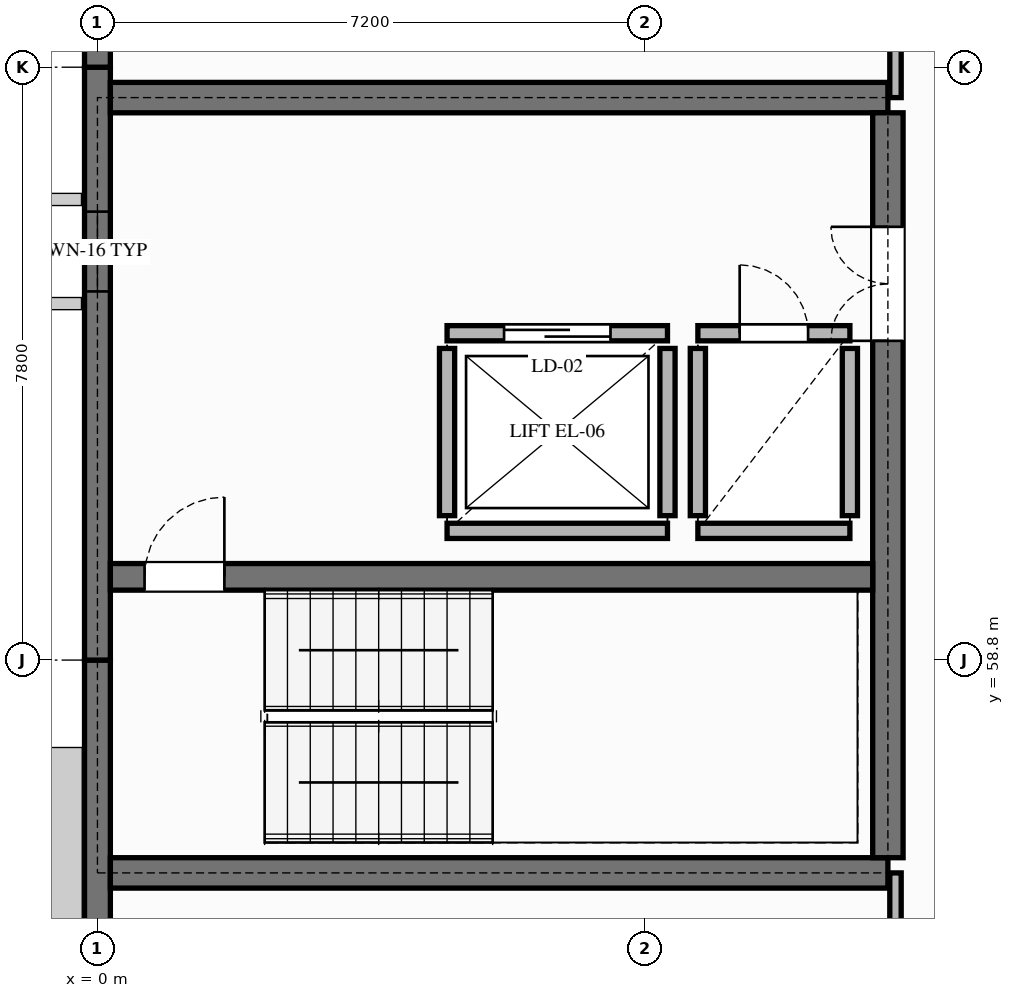
"""IFC4 building model, lengths in metres.
Left out: names, types, materials, properties, quantities, classifications, styles, units other than length and angle.
Written with IfcOpenShell. Run it as: python <this file> out.ifc"""

import sys

from ifc_helpers import new_model, si_unit, direction, frame, frame_2d, origin, place, context, subcontext, project, spatial, rectangle, extrude, element, fill, save


model = new_model("IFC4")
c1 = context("Model", 3, precision=1e-05, world=origin(), true_north=direction((0.0, 1.0)))
c2 = subcontext(c1, "Body", "Model", "MODEL_VIEW")
j1 = project(units=[si_unit("LENGTHUNIT", "METRE"), si_unit("PLANEANGLEUNIT", "RADIAN")], contexts=[c1])
p1 = place(None, origin())
s1 = spatial("IfcSite", under=j1, at=p1, CompositionType="ELEMENT")
p2 = place(p1, origin())
s2 = spatial("IfcBuilding", under=s1, at=p2, CompositionType="ELEMENT")
p3 = place(p2, frame((0.0, 0.0, 5.1)))
s3 = spatial("IfcBuildingStorey", under=s2, at=p3, CompositionType="ELEMENT", Elevation=5.1)
p4 = place(p3, frame((0.0, 51.0, 0.0), z_axis=(0.0, 0.0, 1.0), x_axis=(0.0, 1.0, 0.0)))
e1 = element("IfcWall", 1, at=p4, inside=s3, PredefinedType="SOLIDWALL", context=c2, shape_type="SweptSolid", body=[
    extrude(rectangle(XDim=7.8, YDim=0.34, at=frame_2d((3.9, 0.0))), origin(), (0.0, 0.0, 1.0), 3.55),
])
p5 = place(p4, frame((1.5, 0.0, 0.85)))
e2 = element("IfcOpeningElement", 2, at=p5, cuts=e1, PredefinedType="OPENING", context=c2, shape_type="SweptSolid", body=[
    extrude(rectangle(XDim=1.75, YDim=2.15, at=frame_2d((0.875, 1.075))), frame((0.0, 0.18, 0.0), z_axis=(0.0, -1.0, 0.0), x_axis=(1.0, 0.0, 0.0)), (0.0, 0.0, 1.0), 0.36),
])
p6 = place(p3, frame((0.0, 58.8, 0.0), z_axis=(0.0, 0.0, 1.0), x_axis=(0.0, 1.0, 0.0)))
e3 = element("IfcWall", 3, at=p6, inside=s3, PredefinedType="SOLIDWALL", context=c2, shape_type="SweptSolid", body=[
    extrude(rectangle(XDim=7.8, YDim=0.34, at=frame_2d((3.9, 0.0))), origin(), (0.0, 0.0, 1.0), 3.55),
])
p7 = place(p6, frame((4.85, 0.0, 1.1)))
e4 = element("IfcOpeningElement", 4, at=p7, cuts=e3, PredefinedType="OPENING", context=c2, shape_type="SweptSolid", body=[
    extrude(rectangle(XDim=1.05, YDim=1.75, at=frame_2d((0.525, 0.875))), frame((0.0, 0.18, 0.0), z_axis=(0.0, -1.0, 0.0), x_axis=(1.0, 0.0, 0.0)), (0.0, 0.0, 1.0), 0.36),
])
p8 = place(p3, frame((0.0, 66.6, 0.0), z_axis=(0.0, 0.0, 1.0), x_axis=(0.0, 1.0, 0.0)))
e5 = element("IfcWall", 5, at=p8, inside=s3, PredefinedType="SOLIDWALL", context=c2, shape_type="SweptSolid", body=[
    extrude(rectangle(XDim=7.8, YDim=0.34, at=frame_2d((3.9, 0.0))), origin(), (0.0, 0.0, 1.0), 3.55),
])
p9 = place(p8, frame((1.5, 0.0, 0.85)))
e6 = element("IfcOpeningElement", 6, at=p9, cuts=e5, PredefinedType="OPENING", context=c2, shape_type="SweptSolid", body=[
    extrude(rectangle(XDim=1.75, YDim=2.15, at=frame_2d((0.875, 1.075))), frame((0.0, 0.18, 0.0), z_axis=(0.0, -1.0, 0.0), x_axis=(1.0, 0.0, 0.0)), (0.0, 0.0, 1.0), 0.36),
])
p10 = place(p8, frame((4.3, 0.0, 0.85)))
e7 = element("IfcOpeningElement", 7, at=p10, cuts=e5, PredefinedType="OPENING", context=c2, shape_type="SweptSolid", body=[
    extrude(rectangle(XDim=2.1, YDim=2.25, at=frame_2d((1.05, 1.125))), frame((0.0, 0.18, 0.0), z_axis=(0.0, -1.0, 0.0), x_axis=(1.0, 0.0, 0.0)), (0.0, 0.0, 1.0), 0.36),
])
for number, where, z_axis, x_axis in (
    (8, (0.17, 56.0, 0.0), (0.0, 0.0, 1.0), (1.0, 0.0, 0.0)),
    (9, (0.17, 66.2, 0.0), (0.0, 0.0, 1.0), (1.0, 0.0, 0.0)),
):
    element("IfcWall", number, at=place(p3, frame(where, z_axis=z_axis, x_axis=x_axis)), inside=s3, PredefinedType="SHEAR", context=c2, shape_type="SweptSolid", body=[
        extrude(rectangle(XDim=10.23, YDim=0.4, at=frame_2d((5.115, 0.0))), origin(), (0.0, 0.0, 1.0), 3.55),
    ])
p11 = place(p3, frame((10.4, 56.2, 0.0), z_axis=(0.0, 0.0, 1.0), x_axis=(0.0, 1.0, 0.0)))
e10 = element("IfcWall", 10, at=p11, inside=s3, PredefinedType="SHEAR", context=c2, shape_type="SweptSolid", body=[
    extrude(rectangle(XDim=9.8, YDim=0.4, at=frame_2d((4.9, 0.0))), origin(), (0.0, 0.0, 1.0), 3.55),
])
p12 = place(p11, frame((6.8, 0.0, 0.0)))
e11 = element("IfcOpeningElement", 11, at=p12, cuts=e10, PredefinedType="OPENING", context=c2, shape_type="SweptSolid", body=[
    extrude(rectangle(XDim=1.5, YDim=2.2, at=frame_2d((0.75, 1.1))), frame((0.0, 0.21, 0.0), z_axis=(0.0, -1.0, 0.0), x_axis=(1.0, 0.0, 0.0)), (0.0, 0.0, 1.0), 0.42),
])
p13 = place(p3, frame((0.17, 59.895, 0.0), z_axis=(0.0, 0.0, 1.0), x_axis=(1.0, 0.0, 0.0)))
e12 = element("IfcWall", 12, at=p13, inside=s3, PredefinedType="SHEAR", context=c2, shape_type="SweptSolid", body=[
    extrude(rectangle(XDim=10.03, YDim=0.35, at=frame_2d((5.015, 0.0))), origin(), (0.0, 0.0, 1.0), 3.55),
])
p14 = place(p13, frame((0.45, 0.0, 0.0)))
e13 = element("IfcOpeningElement", 13, at=p14, cuts=e12, PredefinedType="OPENING", context=c2, shape_type="SweptSolid", body=[
    extrude(rectangle(XDim=1.05, YDim=2.2, at=frame_2d((0.525, 1.1))), frame((0.0, 0.185, 0.0), z_axis=(0.0, -1.0, 0.0), x_axis=(1.0, 0.0, 0.0)), (0.0, 0.0, 1.0), 0.37),
])
p15 = place(p3, frame((4.6, 60.5, 0.0), z_axis=(0.0, 0.0, 1.0), x_axis=(1.0, 0.0, 0.0)))
e14 = element("IfcWall", 14, at=p15, inside=s3, PredefinedType="PARTITIONING", context=c2, shape_type="SweptSolid", body=[
    extrude(rectangle(XDim=2.9, YDim=0.2, at=frame_2d((1.45, 0.0))), origin(), (0.0, 0.0, 1.0), 3.55),
])
p16 = place(p3, frame((4.6, 63.1, 0.0), z_axis=(0.0, 0.0, 1.0), x_axis=(1.0, 0.0, 0.0)))
e15 = element("IfcWall", 15, at=p16, inside=s3, PredefinedType="PARTITIONING", context=c2, shape_type="SweptSolid", body=[
    extrude(rectangle(XDim=2.9, YDim=0.2, at=frame_2d((1.45, 0.0))), origin(), (0.0, 0.0, 1.0), 3.55),
])
p17 = place(p16, frame((0.75, 0.0, 0.0)))
e16 = element("IfcOpeningElement", 16, at=p17, cuts=e15, PredefinedType="OPENING", context=c2, shape_type="SweptSolid", body=[
    extrude(rectangle(XDim=1.4, YDim=2.25, at=frame_2d((0.7, 1.125))), frame((0.0, 0.11, 0.0), z_axis=(0.0, -1.0, 0.0), x_axis=(1.0, 0.0, 0.0)), (0.0, 0.0, 1.0), 0.22),
])
for number, where, z_axis, x_axis in (
    (17, (4.6, 60.7, 0.0), (0.0, 0.0, 1.0), (0.0, 1.0, 0.0)),
    (18, (7.5, 60.7, 0.0), (0.0, 0.0, 1.0), (0.0, 1.0, 0.0)),
):
    element("IfcWall", number, at=place(p3, frame(where, z_axis=z_axis, x_axis=x_axis)), inside=s3, PredefinedType="PARTITIONING", context=c2, shape_type="SweptSolid", body=[
        extrude(rectangle(XDim=2.2, YDim=0.2, at=frame_2d((1.1, 0.0))), origin(), (0.0, 0.0, 1.0), 3.55),
    ])
p18 = place(p3, frame((7.9, 60.5, 0.0), z_axis=(0.0, 0.0, 1.0), x_axis=(1.0, 0.0, 0.0)))
e19 = element("IfcWall", 19, at=p18, inside=s3, PredefinedType="PARTITIONING", context=c2, shape_type="SweptSolid", body=[
    extrude(rectangle(XDim=2.0, YDim=0.2, at=frame_2d((1.0, 0.0))), origin(), (0.0, 0.0, 1.0), 3.55),
])
p19 = place(p3, frame((7.9, 63.1, 0.0), z_axis=(0.0, 0.0, 1.0), x_axis=(1.0, 0.0, 0.0)))
e20 = element("IfcWall", 20, at=p19, inside=s3, PredefinedType="PARTITIONING", context=c2, shape_type="SweptSolid", body=[
    extrude(rectangle(XDim=2.0, YDim=0.2, at=frame_2d((1.0, 0.0))), origin(), (0.0, 0.0, 1.0), 3.55),
])
p20 = place(p19, frame((0.55, 0.0, 0.0)))
e21 = element("IfcOpeningElement", 21, at=p20, cuts=e20, PredefinedType="OPENING", context=c2, shape_type="SweptSolid", body=[
    extrude(rectangle(XDim=0.9, YDim=2.1, at=frame_2d((0.45, 1.05))), frame((0.0, 0.11, 0.0), z_axis=(0.0, -1.0, 0.0), x_axis=(1.0, 0.0, 0.0)), (0.0, 0.0, 1.0), 0.22),
])
for number, where, z_axis, x_axis in (
    (22, (7.9, 60.7, 0.0), (0.0, 0.0, 1.0), (0.0, 1.0, 0.0)),
    (23, (9.9, 60.7, 0.0), (0.0, 0.0, 1.0), (0.0, 1.0, 0.0)),
):
    element("IfcWall", number, at=place(p3, frame(where, z_axis=z_axis, x_axis=x_axis)), inside=s3, PredefinedType="PARTITIONING", context=c2, shape_type="SweptSolid", body=[
        extrude(rectangle(XDim=2.2, YDim=0.2, at=frame_2d((1.1, 0.0))), origin(), (0.0, 0.0, 1.0), 3.55),
    ])
p21 = place(p3, frame((10.5, 28.8, 0.0), z_axis=(0.0, 0.0, 1.0), x_axis=(0.0, 1.0, 0.0)))
e24 = element("IfcWall", 24, at=p21, inside=s3, PredefinedType="PARTITIONING", context=c2, shape_type="SweptSolid", body=[
    extrude(rectangle(XDim=27.2, YDim=0.15, at=frame_2d((13.6, 0.0))), origin(), (0.0, 0.0, 1.0), 3.199),
])
p22 = place(p21, frame((10.0, 0.0, 0.0)))
e25 = element("IfcOpeningElement", 25, at=p22, cuts=e24, PredefinedType="OPENING", context=c2, shape_type="SweptSolid", body=[
    extrude(rectangle(XDim=1.0, YDim=2.15, at=frame_2d((0.5, 1.075))), frame((0.0, 0.085, 0.0), z_axis=(0.0, -1.0, 0.0), x_axis=(1.0, 0.0, 0.0)), (0.0, 0.0, 1.0), 0.17),
])
p23 = place(p3, frame((10.5, 66.2, 0.0), z_axis=(0.0, 0.0, 1.0), x_axis=(0.0, 1.0, 0.0)))
e26 = element("IfcWall", 26, at=p23, inside=s3, PredefinedType="PARTITIONING", context=c2, shape_type="SweptSolid", body=[
    extrude(rectangle(XDim=8.2, YDim=0.15, at=frame_2d((4.1, 0.0))), origin(), (0.0, 0.0, 1.0), 3.55),
])
p24 = place(p23, frame((3.2, 0.0, 0.0)))
e27 = element("IfcOpeningElement", 27, at=p24, cuts=e26, PredefinedType="OPENING", context=c2, shape_type="SweptSolid", body=[
    extrude(rectangle(XDim=1.0, YDim=2.15, at=frame_2d((0.5, 1.075))), frame((0.0, 0.085, 0.0), z_axis=(0.0, -1.0, 0.0), x_axis=(1.0, 0.0, 0.0)), (0.0, 0.0, 1.0), 0.17),
])
p25 = place(p7, origin())
e28 = element("IfcWindow", 28, at=p25, inside=s3, PartitioningType="SINGLE_PANEL", PredefinedType="WINDOW", context=c2, shape_type="SweptSolid", body=[
    extrude(rectangle(XDim=1.05, YDim=1.75, at=frame_2d((0.525, 0.875))), frame((0.0, 0.03, 0.0), z_axis=(0.0, -1.0, 0.0), x_axis=(1.0, 0.0, 0.0)), (0.0, 0.0, 1.0), 0.06),
])
fill(e4, e28)
p26 = place(p12, origin())
e29 = element("IfcDoor", 29, at=p26, inside=s3, OperationType="DOUBLE_DOOR_SINGLE_SWING", PredefinedType="DOOR", context=c2, shape_type="SweptSolid", body=[
    extrude(rectangle(XDim=1.5, YDim=2.2, at=frame_2d((0.75, 1.1))), frame((0.0, 0.025, 0.0), z_axis=(0.0, -1.0, 0.0), x_axis=(1.0, 0.0, 0.0)), (0.0, 0.0, 1.0), 0.05),
])
fill(e11, e29)
p27 = place(p14, origin())
e30 = element("IfcDoor", 30, at=p27, inside=s3, OperationType="SINGLE_SWING_RIGHT", PredefinedType="DOOR", context=c2, shape_type="SweptSolid", body=[
    extrude(rectangle(XDim=1.05, YDim=2.2, at=frame_2d((0.525, 1.1))), frame((0.0, 0.025, 0.0), z_axis=(0.0, -1.0, 0.0), x_axis=(1.0, 0.0, 0.0)), (0.0, 0.0, 1.0), 0.05),
])
fill(e13, e30)
p28 = place(p17, origin())
e31 = element("IfcDoor", 31, at=p28, inside=s3, OperationType="SLIDING_TO_LEFT", PredefinedType="DOOR", context=c2, shape_type="SweptSolid", body=[
    extrude(rectangle(XDim=1.4, YDim=2.25, at=frame_2d((0.7, 1.125))), frame((0.0, 0.025, 0.0), z_axis=(0.0, -1.0, 0.0), x_axis=(1.0, 0.0, 0.0)), (0.0, 0.0, 1.0), 0.05),
])
fill(e16, e31)
p29 = place(p20, origin())
e32 = element("IfcDoor", 32, at=p29, inside=s3, OperationType="SINGLE_SWING_LEFT", PredefinedType="DOOR", context=c2, shape_type="SweptSolid", body=[
    extrude(rectangle(XDim=0.9, YDim=2.1, at=frame_2d((0.45, 1.05))), frame((0.0, 0.025, 0.0), z_axis=(0.0, -1.0, 0.0), x_axis=(1.0, 0.0, 0.0)), (0.0, 0.0, 1.0), 0.05),
])
fill(e21, e32)
save(model, sys.argv[1])
